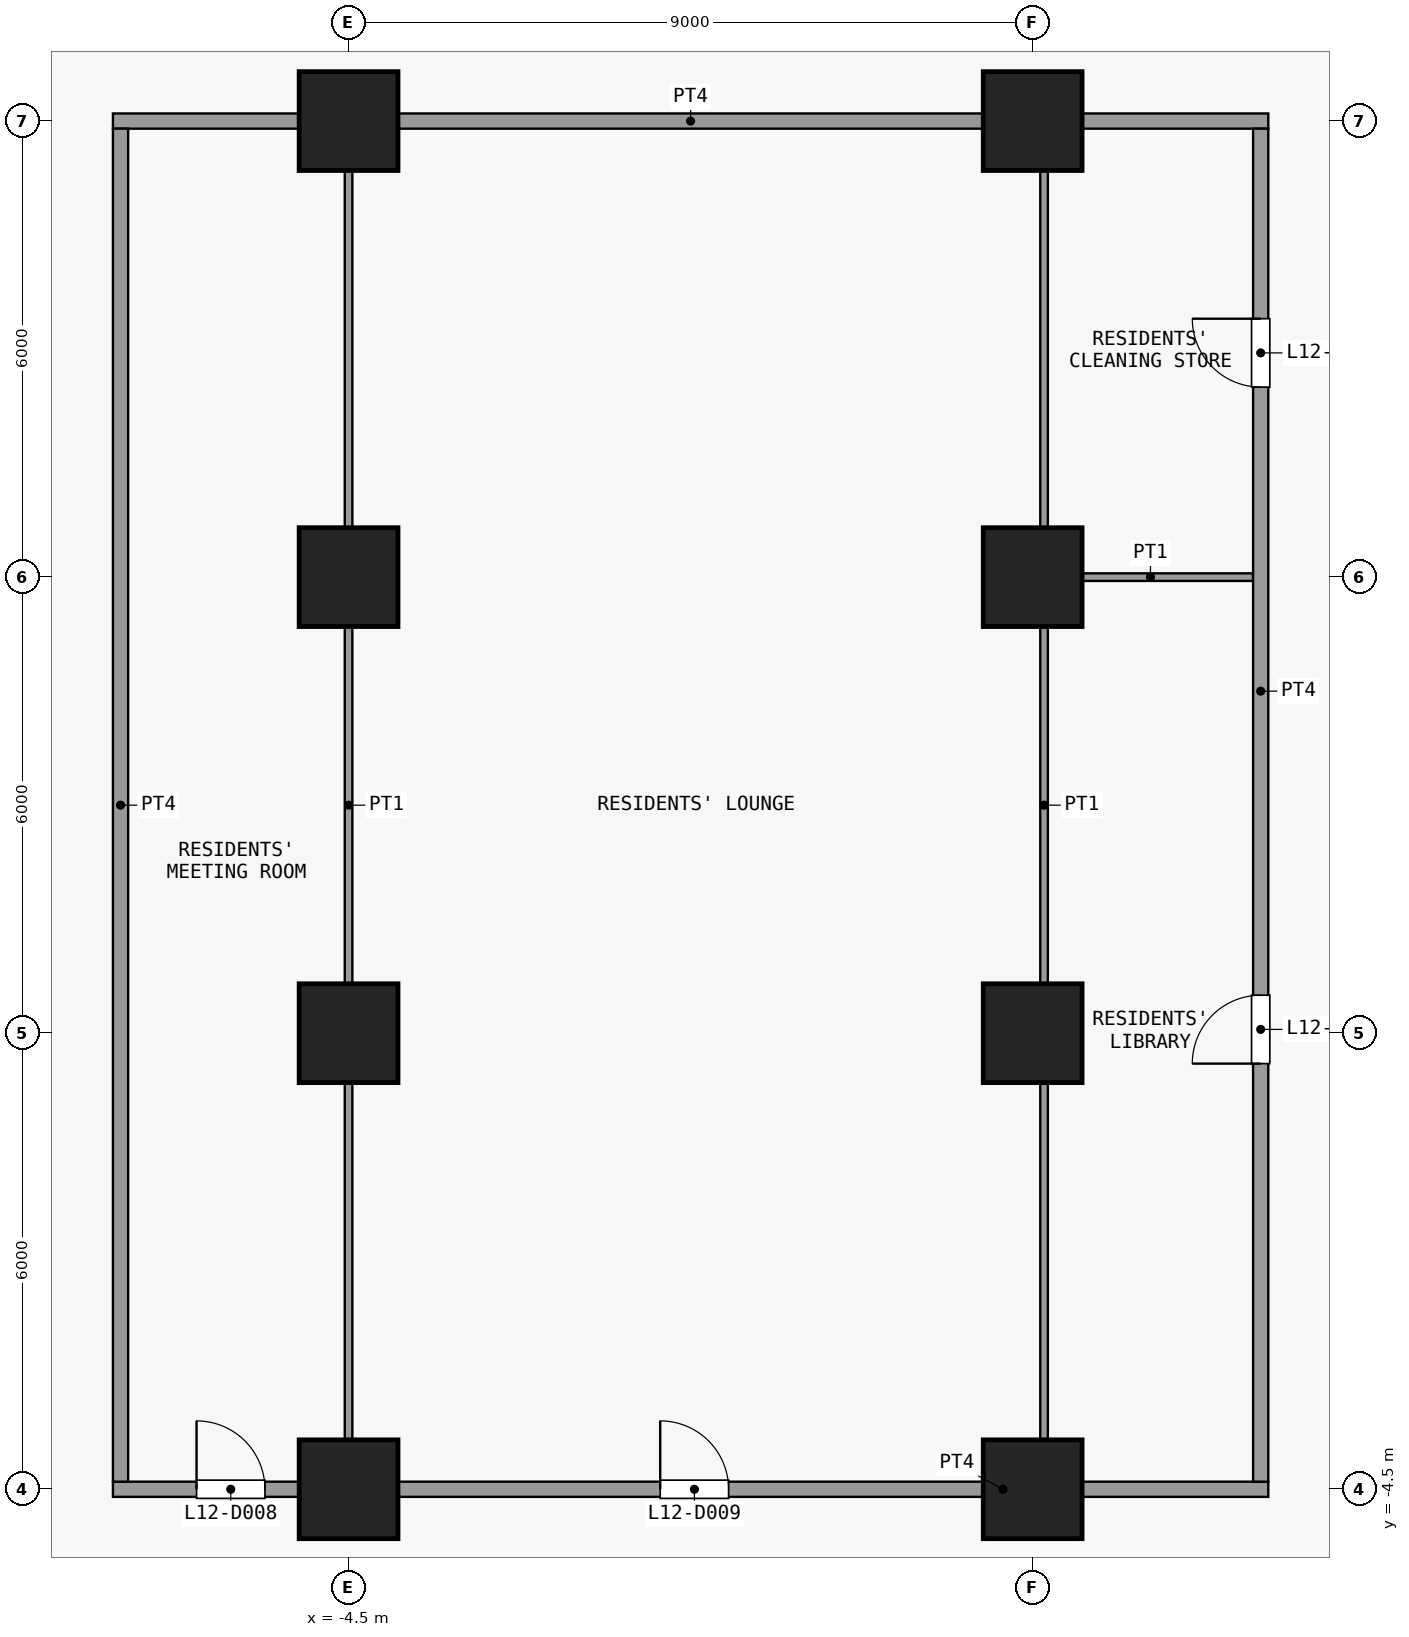
"""IFC4 building model, lengths in metres.
Left out: names, types, materials, properties, quantities, classifications, styles, units other than length and angle.
Written with IfcOpenShell. Run it as: python <this file> out.ifc"""

import sys

from ifc_helpers import new_model, si_unit, direction, frame, frame_2d, origin, origin_2d, place, context, subcontext, project, spatial, rectangle, extrude, element, fill, save


model = new_model("IFC4")
c1 = context("Model", 3, precision=1e-05, world=origin(), true_north=direction((0.0, 1.0)))
c2 = subcontext(c1, "Body", "Model", "MODEL_VIEW")
j1 = project(units=[si_unit("LENGTHUNIT", "METRE"), si_unit("PLANEANGLEUNIT", "RADIAN")], contexts=[c1])
p1 = place(None, origin())
s1 = spatial("IfcSite", under=j1, at=p1, CompositionType="ELEMENT")
p2 = place(p1, origin())
s2 = spatial("IfcBuilding", under=s1, at=p2, CompositionType="ELEMENT")
p3 = place(p2, frame((0.0, 0.0, 54.1)))
s3 = spatial("IfcBuildingStorey", under=s2, at=p3, CompositionType="ELEMENT", Elevation=54.1)
for number, where, z_axis, x_axis in (
    (1, (-4.5, -4.5, 0.0), (0.0, 0.0, 1.0), (1.0, 0.0, 0.0)),
    (2, (-4.5, 1.5, 0.0), (0.0, 0.0, 1.0), (1.0, 0.0, 0.0)),
    (3, (-4.5, 7.5, 0.0), (0.0, 0.0, 1.0), (1.0, 0.0, 0.0)),
    (4, (-4.5, 13.5, 0.0), (0.0, 0.0, 1.0), (1.0, 0.0, 0.0)),
    (5, (4.5, -4.5, 0.0), (0.0, 0.0, 1.0), (1.0, 0.0, 0.0)),
    (6, (4.5, 1.5, 0.0), (0.0, 0.0, 1.0), (1.0, 0.0, 0.0)),
    (7, (4.5, 7.5, 0.0), (0.0, 0.0, 1.0), (1.0, 0.0, 0.0)),
    (8, (4.5, 13.5, 0.0), (0.0, 0.0, 1.0), (1.0, 0.0, 0.0)),
):
    element("IfcColumn", number, at=place(p3, frame(where, z_axis=z_axis, x_axis=x_axis)), inside=s3, PredefinedType="COLUMN", context=c2, shape_type="SweptSolid", body=[
        extrude(rectangle(XDim=1.3, YDim=1.3, at=origin_2d()), origin(), (0.0, 0.0, 1.0), 3.6),
    ])
p4 = place(p3, frame((-7.6, -4.5, 0.0), z_axis=(0.0, 0.0, 1.0), x_axis=(1.0, 0.0, 0.0)))
e9 = element("IfcWall", 9, at=p4, inside=s3, PredefinedType="PARTITIONING", context=c2, shape_type="SweptSolid", body=[
    extrude(rectangle(XDim=15.2, YDim=0.2, at=frame_2d((7.6, 0.0))), origin(), (0.0, 0.0, 1.0), 3.3),
])
p5 = place(p4, frame((1.1, 0.0, 0.0)))
e10 = element("IfcOpeningElement", 10, at=p5, cuts=e9, PredefinedType="OPENING", context=c2, shape_type="SweptSolid", body=[
    extrude(rectangle(XDim=0.9, YDim=2.1, at=frame_2d((0.45, 1.05))), frame((0.0, 0.11, 0.0), z_axis=(0.0, -1.0, 0.0), x_axis=(1.0, 0.0, 0.0)), (0.0, 0.0, 1.0), 0.22),
])
p6 = place(p4, frame((7.2, 0.0, 0.0)))
e11 = element("IfcOpeningElement", 11, at=p6, cuts=e9, PredefinedType="OPENING", context=c2, shape_type="SweptSolid", body=[
    extrude(rectangle(XDim=0.9, YDim=2.1, at=frame_2d((0.45, 1.05))), frame((0.0, 0.11, 0.0), z_axis=(0.0, -1.0, 0.0), x_axis=(1.0, 0.0, 0.0)), (0.0, 0.0, 1.0), 0.22),
])
p7 = place(p3, frame((4.7, 7.5, 0.0), z_axis=(0.0, 0.0, 1.0), x_axis=(1.0, 0.0, 0.0)))
e12 = element("IfcWall", 12, at=p7, inside=s3, PredefinedType="PARTITIONING", context=c2, shape_type="SweptSolid", body=[
    extrude(rectangle(XDim=2.7, YDim=0.1, at=frame_2d((1.35, 0.0))), origin(), (0.0, 0.0, 1.0), 3.3),
])
p8 = place(p3, frame((-7.6, 13.5, 0.0), z_axis=(0.0, 0.0, 1.0), x_axis=(1.0, 0.0, 0.0)))
e13 = element("IfcWall", 13, at=p8, inside=s3, PredefinedType="PARTITIONING", context=c2, shape_type="SweptSolid", body=[
    extrude(rectangle(XDim=15.2, YDim=0.2, at=frame_2d((7.6, 0.0))), origin(), (0.0, 0.0, 1.0), 3.3),
])
p9 = place(p3, frame((-7.5, -4.4, 0.0), z_axis=(0.0, 0.0, 1.0), x_axis=(0.0, 1.0, 0.0)))
e14 = element("IfcWall", 14, at=p9, inside=s3, PredefinedType="PARTITIONING", context=c2, shape_type="SweptSolid", body=[
    extrude(rectangle(XDim=17.8, YDim=0.2, at=frame_2d((8.9, 0.0))), origin(), (0.0, 0.0, 1.0), 3.3),
])
for number, where, z_axis, x_axis in (
    (15, (-4.5, -4.4, 0.0), (0.0, 0.0, 1.0), (0.0, 1.0, 0.0)),
    (16, (4.65, -4.4, 0.0), (0.0, 0.0, 1.0), (0.0, 1.0, 0.0)),
):
    element("IfcWall", number, at=place(p3, frame(where, z_axis=z_axis, x_axis=x_axis)), inside=s3, PredefinedType="PARTITIONING", context=c2, shape_type="SweptSolid", body=[
        extrude(rectangle(XDim=17.8, YDim=0.1, at=frame_2d((8.9, 0.0))), origin(), (0.0, 0.0, 1.0), 3.3),
    ])
p10 = place(p3, frame((7.5, -4.4, 0.0), z_axis=(0.0, 0.0, 1.0), x_axis=(0.0, 1.0, 0.0)))
e17 = element("IfcWall", 17, at=p10, inside=s3, PredefinedType="PARTITIONING", context=c2, shape_type="SweptSolid", body=[
    extrude(rectangle(XDim=17.8, YDim=0.2, at=frame_2d((8.9, 0.0))), origin(), (0.0, 0.0, 1.0), 3.3),
])
p11 = place(p10, frame((5.5, 0.0, 0.0)))
e18 = element("IfcOpeningElement", 18, at=p11, cuts=e17, PredefinedType="OPENING", context=c2, shape_type="SweptSolid", body=[
    extrude(rectangle(XDim=0.9, YDim=2.1, at=frame_2d((0.45, 1.05))), frame((0.0, 0.11, 0.0), z_axis=(0.0, -1.0, 0.0), x_axis=(1.0, 0.0, 0.0)), (0.0, 0.0, 1.0), 0.22),
])
p12 = place(p10, frame((14.4, 0.0, 0.0)))
e19 = element("IfcOpeningElement", 19, at=p12, cuts=e17, PredefinedType="OPENING", context=c2, shape_type="SweptSolid", body=[
    extrude(rectangle(XDim=0.9, YDim=2.1, at=frame_2d((0.45, 1.05))), frame((0.0, 0.11, 0.0), z_axis=(0.0, -1.0, 0.0), x_axis=(1.0, 0.0, 0.0)), (0.0, 0.0, 1.0), 0.22),
])
p13 = place(p5, origin())
e20 = element("IfcDoor", 20, at=p13, inside=s3, OperationType="SINGLE_SWING_RIGHT", PredefinedType="DOOR", context=c2, shape_type="SweptSolid", body=[
    extrude(rectangle(XDim=0.9, YDim=2.1, at=frame_2d((0.45, 1.05))), frame((0.0, 0.025, 0.0), z_axis=(0.0, -1.0, 0.0), x_axis=(1.0, 0.0, 0.0)), (0.0, 0.0, 1.0), 0.05),
])
fill(e10, e20)
p14 = place(p6, origin())
e21 = element("IfcDoor", 21, at=p14, inside=s3, OperationType="SINGLE_SWING_RIGHT", PredefinedType="DOOR", context=c2, shape_type="SweptSolid", body=[
    extrude(rectangle(XDim=0.9, YDim=2.1, at=frame_2d((0.45, 1.05))), frame((0.0, 0.025, 0.0), z_axis=(0.0, -1.0, 0.0), x_axis=(1.0, 0.0, 0.0)), (0.0, 0.0, 1.0), 0.05),
])
fill(e11, e21)
p15 = place(p11, origin())
e22 = element("IfcDoor", 22, at=p15, inside=s3, OperationType="SINGLE_SWING_RIGHT", PredefinedType="DOOR", context=c2, shape_type="SweptSolid", body=[
    extrude(rectangle(XDim=0.9, YDim=2.1, at=frame_2d((0.45, 1.05))), frame((0.0, 0.025, 0.0), z_axis=(0.0, -1.0, 0.0), x_axis=(1.0, 0.0, 0.0)), (0.0, 0.0, 1.0), 0.05),
])
fill(e18, e22)
p16 = place(p12, origin())
e23 = element("IfcDoor", 23, at=p16, inside=s3, OperationType="SINGLE_SWING_LEFT", PredefinedType="DOOR", context=c2, shape_type="SweptSolid", body=[
    extrude(rectangle(XDim=0.9, YDim=2.1, at=frame_2d((0.45, 1.05))), frame((0.0, 0.025, 0.0), z_axis=(0.0, -1.0, 0.0), x_axis=(1.0, 0.0, 0.0)), (0.0, 0.0, 1.0), 0.05),
])
fill(e19, e23)
save(model, sys.argv[1])
